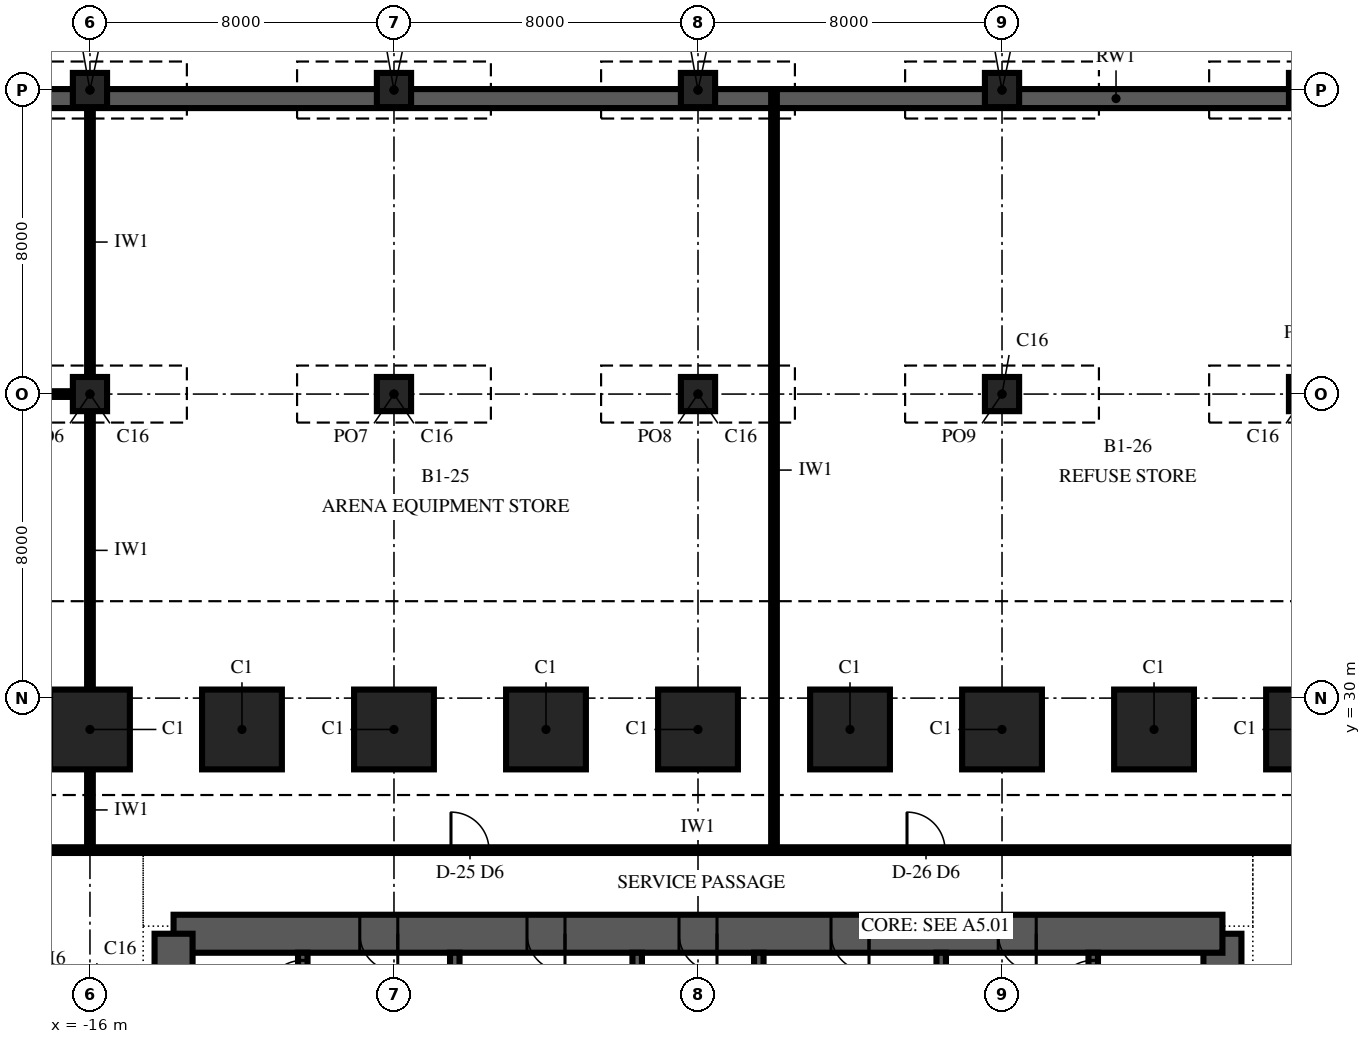
"""IFC4 building model, lengths in metres.
Left out: names, types, materials, properties, quantities, classifications, styles, units other than length and angle.
Written with IfcOpenShell. Run it as: python <this file> out.ifc"""

import sys

from ifc_helpers import new_model, si_unit, direction, frame, frame_2d, origin, origin_2d, place, context, subcontext, project, spatial, polyline, rectangle, outline, extrude, element, fill, save


model = new_model("IFC4")
c1 = context("Model", 3, precision=1e-05, world=origin(), true_north=direction((0.0, 1.0)))
c2 = subcontext(c1, "Body", "Model", "MODEL_VIEW")
j1 = project(units=[si_unit("LENGTHUNIT", "METRE"), si_unit("PLANEANGLEUNIT", "RADIAN")], contexts=[c1])
p1 = place(None, origin())
s1 = spatial("IfcSite", under=j1, at=p1, CompositionType="ELEMENT")
p2 = place(p1, origin())
s2 = spatial("IfcBuilding", under=s1, at=p2, CompositionType="ELEMENT")
p3 = place(p2, frame((0.0, 0.0, -7.0)))
s3 = spatial("IfcBuildingStorey", under=s2, at=p3, CompositionType="ELEMENT", Elevation=-7.0)
for number, where, z_axis, x_axis in (
    (1, (16.0, 29.175, -0.6), (0.0, 0.0, 1.0), (-1.0, 0.0, 0.0)),
    (2, (12.0, 29.175, -0.6), (0.0, 0.0, 1.0), (-1.0, 0.0, 0.0)),
    (3, (8.0, 29.175, -0.6), (0.0, 0.0, 1.0), (-1.0, 0.0, 0.0)),
    (4, (4.0, 29.175, -0.6), (0.0, 0.0, 1.0), (-1.0, 0.0, 0.0)),
    (5, (0.0, 29.175, -0.6), (0.0, 0.0, 1.0), (-1.0, 0.0, 0.0)),
    (6, (-4.0, 29.175, -0.6), (0.0, 0.0, 1.0), (-1.0, 0.0, 0.0)),
    (7, (-8.0, 29.175, -0.6), (0.0, 0.0, 1.0), (-1.0, 0.0, 0.0)),
    (8, (-12.0, 29.175, -0.6), (0.0, 0.0, 1.0), (-1.0, 0.0, 0.0)),
    (9, (-16.0, 29.175, -0.6), (0.0, 0.0, 1.0), (-1.0, 0.0, 0.0)),
):
    element("IfcColumn", number, at=place(p3, frame(where, z_axis=z_axis, x_axis=x_axis)), inside=s3, PredefinedType="COLUMN", context=c2, shape_type="SweptSolid", body=[
        extrude(rectangle(XDim=2.1, YDim=2.1, at=origin_2d()), origin(), (0.0, 0.0, 1.0), 7.6),
    ])
for number, where, z_axis, x_axis in (
    (10, (-16.0, 38.0, -0.6), (0.0, 0.0, 1.0), (1.0, 0.0, 0.0)),
    (11, (-16.0, 46.0, -0.6), (0.0, 0.0, 1.0), (1.0, 0.0, 0.0)),
    (12, (-8.0, 38.0, -0.6), (0.0, 0.0, 1.0), (1.0, 0.0, 0.0)),
    (13, (-8.0, 46.0, -0.6), (0.0, 0.0, 1.0), (1.0, 0.0, 0.0)),
    (14, (0.0, 38.0, -0.6), (0.0, 0.0, 1.0), (1.0, 0.0, 0.0)),
    (15, (0.0, 46.0, -0.6), (0.0, 0.0, 1.0), (1.0, 0.0, 0.0)),
    (16, (8.0, 38.0, -0.6), (0.0, 0.0, 1.0), (1.0, 0.0, 0.0)),
    (17, (8.0, 46.0, -0.6), (0.0, 0.0, 1.0), (1.0, 0.0, 0.0)),
    (18, (16.0, 38.0, -0.6), (0.0, 0.0, 1.0), (1.0, 0.0, 0.0)),
    (19, (16.0, 46.0, -0.6), (0.0, 0.0, 1.0), (1.0, 0.0, 0.0)),
):
    element("IfcColumn", number, at=place(p3, frame(where, z_axis=z_axis, x_axis=x_axis)), inside=s3, PredefinedType="COLUMN", context=c2, shape_type="SweptSolid", body=[
        extrude(rectangle(XDim=0.9, YDim=0.9, at=origin_2d()), origin(), (0.0, 0.0, 1.0), 7.6),
    ])
p4 = place(p3, frame((13.8, 6.2, 0.0), z_axis=(0.0, 0.0, 1.0), x_axis=(0.0, 1.0, 0.0)))
e20 = element("IfcWall", 20, at=p4, inside=s3, PredefinedType="SHEAR", context=c2, shape_type="SweptSolid", body=[
    extrude(outline(polyline([(0.0, -0.5), (17.6, -0.5), (17.6, 0.0), (17.1, 0.0), (17.1, 0.5), (0.5, 0.5), (0.5, 0.0), (0.0, 0.0), (0.0, -0.5)])), origin(), (0.0, 0.0, 1.0), 7.0),
])
p5 = place(p4, frame((4.1, 0.0, 0.0)))
e21 = element("IfcOpeningElement", 21, at=p5, cuts=e20, PredefinedType="OPENING", context=c2, shape_type="SweptSolid", body=[
    extrude(rectangle(XDim=1.8, YDim=2.4, at=frame_2d((0.9, 1.2))), frame((0.0, 0.515, 0.0), z_axis=(0.0, -1.0, 0.0), x_axis=(1.0, 0.0, 0.0)), (0.0, 0.0, 1.0), 1.03),
])
p6 = place(p3, frame((13.8, 23.8, 0.0), z_axis=(0.0, 0.0, 1.0), x_axis=(-1.0, 0.0, 0.0)))
e22 = element("IfcWall", 22, at=p6, inside=s3, PredefinedType="SHEAR", context=c2, shape_type="SweptSolid", body=[
    extrude(rectangle(XDim=27.6, YDim=1.0, at=frame_2d((13.8, 0.0))), origin(), (0.0, 0.0, 1.0), 7.0),
])
p7 = place(p6, frame((21.7, 0.0, 0.0)))
e23 = element("IfcOpeningElement", 23, at=p7, cuts=e22, PredefinedType="OPENING", context=c2, shape_type="SweptSolid", body=[
    extrude(rectangle(XDim=1.0, YDim=2.1, at=frame_2d((0.5, 1.05))), frame((0.0, 0.515, 0.0), z_axis=(0.0, -1.0, 0.0), x_axis=(1.0, 0.0, 0.0)), (0.0, 0.0, 1.0), 1.03),
])
p8 = place(p6, frame((4.9, 0.0, 0.0)))
e24 = element("IfcOpeningElement", 24, at=p8, cuts=e22, PredefinedType="OPENING", context=c2, shape_type="SweptSolid", body=[
    extrude(rectangle(XDim=1.0, YDim=2.1, at=frame_2d((0.5, 1.05))), frame((0.0, 0.515, 0.0), z_axis=(0.0, -1.0, 0.0), x_axis=(1.0, 0.0, 0.0)), (0.0, 0.0, 1.0), 1.03),
])
p9 = place(p6, frame((17.3, 0.0, 0.0)))
e25 = element("IfcOpeningElement", 25, at=p9, cuts=e22, PredefinedType="OPENING", context=c2, shape_type="SweptSolid", body=[
    extrude(rectangle(XDim=1.0, YDim=2.1, at=frame_2d((0.5, 1.05))), frame((0.0, 0.515, 0.0), z_axis=(0.0, -1.0, 0.0), x_axis=(1.0, 0.0, 0.0)), (0.0, 0.0, 1.0), 1.03),
])
p10 = place(p6, frame((13.3, 0.0, 0.0)))
e26 = element("IfcOpeningElement", 26, at=p10, cuts=e22, PredefinedType="OPENING", context=c2, shape_type="SweptSolid", body=[
    extrude(rectangle(XDim=1.0, YDim=2.1, at=frame_2d((0.5, 1.05))), frame((0.0, 0.515, 0.0), z_axis=(0.0, -1.0, 0.0), x_axis=(1.0, 0.0, 0.0)), (0.0, 0.0, 1.0), 1.03),
])
p11 = place(p6, frame((9.3, 0.0, 0.0)))
e27 = element("IfcOpeningElement", 27, at=p11, cuts=e22, PredefinedType="OPENING", context=c2, shape_type="SweptSolid", body=[
    extrude(rectangle(XDim=1.0, YDim=2.1, at=frame_2d((0.5, 1.05))), frame((0.0, 0.515, 0.0), z_axis=(0.0, -1.0, 0.0), x_axis=(1.0, 0.0, 0.0)), (0.0, 0.0, 1.0), 1.03),
])
p12 = place(p3, frame((-13.8, 23.8, 0.0), z_axis=(0.0, 0.0, 1.0), x_axis=(0.0, -1.0, 0.0)))
e28 = element("IfcWall", 28, at=p12, inside=s3, PredefinedType="SHEAR", context=c2, shape_type="SweptSolid", body=[
    extrude(outline(polyline([(0.0, -0.5), (17.6, -0.5), (17.6, 0.0), (17.1, 0.0), (17.1, 0.5), (0.5, 0.5), (0.5, 0.0), (0.0, 0.0), (0.0, -0.5)])), origin(), (0.0, 0.0, 1.0), 7.0),
])
p13 = place(p12, frame((11.7, 0.0, 0.0)))
e29 = element("IfcOpeningElement", 29, at=p13, cuts=e28, PredefinedType="OPENING", context=c2, shape_type="SweptSolid", body=[
    extrude(rectangle(XDim=1.8, YDim=2.4, at=frame_2d((0.9, 1.2))), frame((0.0, 0.515, 0.0), z_axis=(0.0, -1.0, 0.0), x_axis=(1.0, 0.0, 0.0)), (0.0, 0.0, 1.0), 1.03),
])
p14 = place(p3, frame((-10.4, 16.125, 0.0), z_axis=(0.0, 0.0, 1.0), x_axis=(0.0, 1.0, 0.0)))
e30 = element("IfcWall", 30, at=p14, inside=s3, PredefinedType="SHEAR", context=c2, shape_type="SweptSolid", body=[
    extrude(rectangle(XDim=7.175, YDim=0.25, at=frame_2d((3.587, 0.0))), origin(), (0.0, 0.0, 1.0), 7.0),
])
p15 = place(p14, frame((5.975, 0.0, 0.0)))
e31 = element("IfcOpeningElement", 31, at=p15, cuts=e30, PredefinedType="OPENING", context=c2, shape_type="SweptSolid", body=[
    extrude(rectangle(XDim=1.0, YDim=2.1, at=frame_2d((0.5, 1.05))), frame((0.0, 0.14, 0.0), z_axis=(0.0, -1.0, 0.0), x_axis=(1.0, 0.0, 0.0)), (0.0, 0.0, 1.0), 0.28),
])
for number, where, z_axis, x_axis in (
    (32, (-6.4, 16.125, 0.0), (0.0, 0.0, 1.0), (0.0, 1.0, 0.0)),
    (33, (-1.6, 16.125, 0.0), (0.0, 0.0, 1.0), (0.0, 1.0, 0.0)),
    (34, (1.6, 16.125, 0.0), (0.0, 0.0, 1.0), (0.0, 1.0, 0.0)),
    (35, (6.4, 16.125, 0.0), (0.0, 0.0, 1.0), (0.0, 1.0, 0.0)),
):
    element("IfcWall", number, at=place(p3, frame(where, z_axis=z_axis, x_axis=x_axis)), inside=s3, PredefinedType="SHEAR", context=c2, shape_type="SweptSolid", body=[
        extrude(rectangle(XDim=7.175, YDim=0.25, at=frame_2d((3.587, 0.0))), origin(), (0.0, 0.0, 1.0), 7.0),
    ])
p16 = place(p3, frame((10.4, 16.125, 0.0), z_axis=(0.0, 0.0, 1.0), x_axis=(0.0, 1.0, 0.0)))
e36 = element("IfcWall", 36, at=p16, inside=s3, PredefinedType="SHEAR", context=c2, shape_type="SweptSolid", body=[
    extrude(rectangle(XDim=7.175, YDim=0.25, at=frame_2d((3.587, 0.0))), origin(), (0.0, 0.0, 1.0), 7.0),
])
p17 = place(p16, frame((5.975, 0.0, 0.0)))
e37 = element("IfcOpeningElement", 37, at=p17, cuts=e36, PredefinedType="OPENING", context=c2, shape_type="SweptSolid", body=[
    extrude(rectangle(XDim=1.0, YDim=2.1, at=frame_2d((0.5, 1.05))), frame((0.0, 0.14, 0.0), z_axis=(0.0, -1.0, 0.0), x_axis=(1.0, 0.0, 0.0)), (0.0, 0.0, 1.0), 0.28),
])
p18 = place(p3, frame((56.0, 45.775, 0.0), z_axis=(0.0, 0.0, 1.0), x_axis=(-1.0, 0.0, 0.0)))
e38 = element("IfcWall", 38, at=p18, inside=s3, PredefinedType="SOLIDWALL", context=c2, shape_type="SweptSolid", body=[
    extrude(rectangle(XDim=90.0, YDim=0.5, at=frame_2d((45.0, 0.0))), origin(), (0.0, 0.0, 1.0), 7.0),
])
p19 = place(p3, frame((-16.0, 26.0, 0.0), z_axis=(0.0, 0.0, 1.0), x_axis=(0.0, 1.0, 0.0)))
e39 = element("IfcWall", 39, at=p19, inside=s3, PredefinedType="PARTITIONING", context=c2, shape_type="SweptSolid", body=[
    extrude(rectangle(XDim=2.115, YDim=0.15, at=frame_2d((1.058, 0.0))), origin(), (0.0, 0.0, 1.0), 6.7),
])
p20 = place(p3, frame((-16.0, 30.235, 0.0), z_axis=(0.0, 0.0, 1.0), x_axis=(0.0, 1.0, 0.0)))
e40 = element("IfcWall", 40, at=p20, inside=s3, PredefinedType="PARTITIONING", context=c2, shape_type="SweptSolid", body=[
    extrude(rectangle(XDim=7.305, YDim=0.15, at=frame_2d((3.652, 0.0))), origin(), (0.0, 0.0, 1.0), 6.7),
])
p21 = place(p3, frame((-16.0, 38.46, 0.0), z_axis=(0.0, 0.0, 1.0), x_axis=(0.0, 1.0, 0.0)))
e41 = element("IfcWall", 41, at=p21, inside=s3, PredefinedType="PARTITIONING", context=c2, shape_type="SweptSolid", body=[
    extrude(rectangle(XDim=7.08, YDim=0.15, at=frame_2d((3.54, 0.0))), origin(), (0.0, 0.0, 1.0), 6.05),
])
p22 = place(p3, frame((2.0, 26.0, 0.0), z_axis=(0.0, 0.0, 1.0), x_axis=(0.0, 1.0, 0.0)))
e42 = element("IfcWall", 42, at=p22, inside=s3, PredefinedType="PARTITIONING", context=c2, shape_type="SweptSolid", body=[
    extrude(rectangle(XDim=20.0, YDim=0.15, at=frame_2d((10.0, 0.0))), origin(), (0.0, 0.0, 1.0), 6.7),
])
p23 = place(p3, frame((-22.493, 26.0, 0.0), z_axis=(0.0, 0.0, 1.0), x_axis=(1.0, 0.0, 0.0)))
e43 = element("IfcWall", 43, at=p23, inside=s3, PredefinedType="PARTITIONING", context=c2, shape_type="SweptSolid", body=[
    extrude(rectangle(XDim=44.986, YDim=0.15, at=frame_2d((22.493, 0.0))), origin(), (0.0, 0.0, 1.0), 6.7),
])
p24 = place(p23, frame((15.993, 0.0, 0.0)))
e44 = element("IfcOpeningElement", 44, at=p24, cuts=e43, PredefinedType="OPENING", context=c2, shape_type="SweptSolid", body=[
    extrude(rectangle(XDim=1.0, YDim=2.1, at=frame_2d((0.5, 1.05))), frame((0.0, 0.09, 0.0), z_axis=(0.0, -1.0, 0.0), x_axis=(1.0, 0.0, 0.0)), (0.0, 0.0, 1.0), 0.18),
])
p25 = place(p23, frame((27.993, 0.0, 0.0)))
e45 = element("IfcOpeningElement", 45, at=p25, cuts=e43, PredefinedType="OPENING", context=c2, shape_type="SweptSolid", body=[
    extrude(rectangle(XDim=1.0, YDim=2.1, at=frame_2d((0.5, 1.05))), frame((0.0, 0.09, 0.0), z_axis=(0.0, -1.0, 0.0), x_axis=(1.0, 0.0, 0.0)), (0.0, 0.0, 1.0), 0.18),
])
p26 = place(p3, frame((-23.54, 38.0, 0.0), z_axis=(0.0, 0.0, 1.0), x_axis=(1.0, 0.0, 0.0)))
e46 = element("IfcWall", 46, at=p26, inside=s3, PredefinedType="PARTITIONING", context=c2, shape_type="SweptSolid", body=[
    extrude(rectangle(XDim=7.08, YDim=0.15, at=frame_2d((3.54, 0.0))), origin(), (0.0, 0.0, 1.0), 6.05),
])
p27 = place(p7, origin())
e47 = element("IfcDoor", 47, at=p27, inside=s3, OperationType="SINGLE_SWING_RIGHT", PredefinedType="DOOR", context=c2, shape_type="SweptSolid", body=[
    extrude(rectangle(XDim=1.0, YDim=2.1, at=frame_2d((0.5, 1.05))), frame((0.0, 0.5, 0.0), z_axis=(0.0, -1.0, 0.0), x_axis=(1.0, 0.0, 0.0)), (0.0, 0.0, 1.0), 1.0),
])
fill(e23, e47)
p28 = place(p8, origin())
e48 = element("IfcDoor", 48, at=p28, inside=s3, OperationType="SINGLE_SWING_RIGHT", PredefinedType="DOOR", context=c2, shape_type="SweptSolid", body=[
    extrude(rectangle(XDim=1.0, YDim=2.1, at=frame_2d((0.5, 1.05))), frame((0.0, 0.5, 0.0), z_axis=(0.0, -1.0, 0.0), x_axis=(1.0, 0.0, 0.0)), (0.0, 0.0, 1.0), 1.0),
])
fill(e24, e48)
p29 = place(p9, origin())
e49 = element("IfcDoor", 49, at=p29, inside=s3, OperationType="SINGLE_SWING_LEFT", PredefinedType="DOOR", context=c2, shape_type="SweptSolid", body=[
    extrude(rectangle(XDim=1.0, YDim=2.1, at=frame_2d((0.5, 1.05))), frame((0.0, 0.5, 0.0), z_axis=(0.0, -1.0, 0.0), x_axis=(1.0, 0.0, 0.0)), (0.0, 0.0, 1.0), 1.0),
])
fill(e25, e49)
p30 = place(p10, origin())
e50 = element("IfcDoor", 50, at=p30, inside=s3, OperationType="SINGLE_SWING_LEFT", PredefinedType="DOOR", context=c2, shape_type="SweptSolid", body=[
    extrude(rectangle(XDim=1.0, YDim=2.1, at=frame_2d((0.5, 1.05))), frame((0.0, 0.5, 0.0), z_axis=(0.0, -1.0, 0.0), x_axis=(1.0, 0.0, 0.0)), (0.0, 0.0, 1.0), 1.0),
])
fill(e26, e50)
p31 = place(p11, origin())
e51 = element("IfcDoor", 51, at=p31, inside=s3, OperationType="SINGLE_SWING_LEFT", PredefinedType="DOOR", context=c2, shape_type="SweptSolid", body=[
    extrude(rectangle(XDim=1.0, YDim=2.1, at=frame_2d((0.5, 1.05))), frame((0.0, 0.5, 0.0), z_axis=(0.0, -1.0, 0.0), x_axis=(1.0, 0.0, 0.0)), (0.0, 0.0, 1.0), 1.0),
])
fill(e27, e51)
p32 = place(p15, origin())
e52 = element("IfcDoor", 52, at=p32, inside=s3, OperationType="SINGLE_SWING_LEFT", PredefinedType="DOOR", context=c2, shape_type="SweptSolid", body=[
    extrude(rectangle(XDim=1.0, YDim=2.1, at=frame_2d((0.5, 1.05))), frame((0.0, 0.125, 0.0), z_axis=(0.0, -1.0, 0.0), x_axis=(1.0, 0.0, 0.0)), (0.0, 0.0, 1.0), 0.25),
])
fill(e31, e52)
p33 = place(p17, origin())
e53 = element("IfcDoor", 53, at=p33, inside=s3, OperationType="SINGLE_SWING_LEFT", PredefinedType="DOOR", context=c2, shape_type="SweptSolid", body=[
    extrude(rectangle(XDim=1.0, YDim=2.1, at=frame_2d((0.5, 1.05))), frame((0.0, 0.125, 0.0), z_axis=(0.0, -1.0, 0.0), x_axis=(1.0, 0.0, 0.0)), (0.0, 0.0, 1.0), 0.25),
])
fill(e37, e53)
p34 = place(p24, origin())
e54 = element("IfcDoor", 54, at=p34, inside=s3, OperationType="SINGLE_SWING_LEFT", PredefinedType="DOOR", context=c2, shape_type="SweptSolid", body=[
    extrude(rectangle(XDim=1.0, YDim=2.1, at=frame_2d((0.5, 1.05))), frame((0.0, 0.075, 0.0), z_axis=(0.0, -1.0, 0.0), x_axis=(1.0, 0.0, 0.0)), (0.0, 0.0, 1.0), 0.149),
])
fill(e44, e54)
p35 = place(p25, origin())
e55 = element("IfcDoor", 55, at=p35, inside=s3, OperationType="SINGLE_SWING_LEFT", PredefinedType="DOOR", context=c2, shape_type="SweptSolid", body=[
    extrude(rectangle(XDim=1.0, YDim=2.1, at=frame_2d((0.5, 1.05))), frame((0.0, 0.075, 0.0), z_axis=(0.0, -1.0, 0.0), x_axis=(1.0, 0.0, 0.0)), (0.0, 0.0, 1.0), 0.149),
])
fill(e45, e55)
save(model, sys.argv[1])
